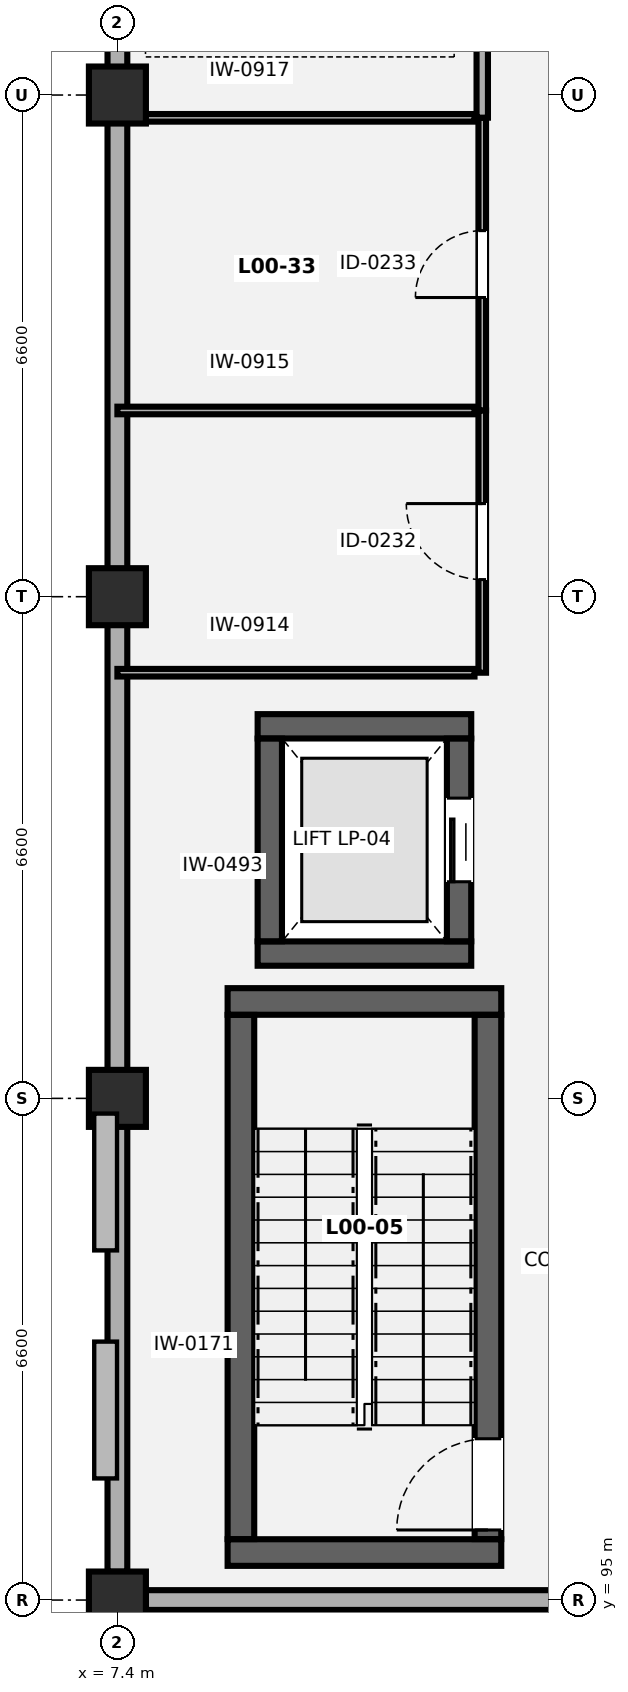
"""IFC4 building model, lengths in metres.
Left out: names, types, materials, properties, quantities, classifications, styles, units other than length and angle.
Written with IfcOpenShell. Run it as: python <this file> out.ifc"""

import sys

from ifc_helpers import new_model, si_unit, direction, frame, frame_2d, origin, origin_2d, place, context, subcontext, project, spatial, rectangle, extrude, element, fill, save


model = new_model("IFC4")
c1 = context("Model", 3, precision=1e-05, world=origin(), true_north=direction((0.0, 1.0)))
c2 = subcontext(c1, "Body", "Model", "MODEL_VIEW")
j1 = project(units=[si_unit("LENGTHUNIT", "METRE"), si_unit("PLANEANGLEUNIT", "RADIAN")], contexts=[c1])
p1 = place(None, origin())
s1 = spatial("IfcSite", under=j1, at=p1, CompositionType="ELEMENT")
p2 = place(p1, origin())
s2 = spatial("IfcBuilding", under=s1, at=p2, CompositionType="ELEMENT")
p3 = place(p2, origin())
s3 = spatial("IfcBuildingStorey", under=s2, at=p3, CompositionType="ELEMENT", Elevation=0.0)
for number, where, z_axis, x_axis in (
    (1, (7.4, 95.0, 0.0), (0.0, 0.0, 1.0), (1.0, 0.0, 0.0)),
    (2, (7.4, 101.6, 0.0), (0.0, 0.0, 1.0), (1.0, 0.0, 0.0)),
    (3, (7.4, 108.2, 0.0), (0.0, 0.0, 1.0), (1.0, 0.0, 0.0)),
    (4, (7.4, 114.8, 0.0), (0.0, 0.0, 1.0), (1.0, 0.0, 0.0)),
):
    element("IfcColumn", number, at=place(p3, frame(where, z_axis=z_axis, x_axis=x_axis)), inside=s3, PredefinedType="COLUMN", context=c2, shape_type="SweptSolid", body=[
        extrude(rectangle(XDim=0.75, YDim=0.75, at=origin_2d()), origin(), (0.0, 0.0, 1.0), 4.9),
    ])
p4 = place(p3, frame((7.4, 95.373, 0.0), z_axis=(0.0, 0.0, 1.0), x_axis=(0.0, 1.0, 0.0)))
e5 = element("IfcWall", 5, at=p4, inside=s3, PredefinedType="SOLIDWALL", context=c2, shape_type="SweptSolid", body=[
    extrude(rectangle(XDim=66.454, YDim=0.26, at=frame_2d((33.227, 0.0))), origin(), (0.0, 0.0, 1.0), 3.585),
])
p5 = place(p3, frame((26.827, 95.0, 0.0), z_axis=(0.0, 0.0, 1.0), x_axis=(-1.0, 0.0, 0.0)))
e6 = element("IfcWall", 6, at=p5, inside=s3, PredefinedType="SOLIDWALL", context=c2, shape_type="SweptSolid", body=[
    extrude(rectangle(XDim=19.054, YDim=0.26, at=frame_2d((9.527, 0.0))), origin(), (0.0, 0.0, 1.0), 3.135),
])
p6 = place(p5, frame((10.577, 0.0, 0.0)))
e7 = element("IfcOpeningElement", 7, at=p6, cuts=e6, PredefinedType="OPENING", context=c2, shape_type="SweptSolid", body=[
    extrude(rectangle(XDim=1.25, YDim=2.15, at=frame_2d((0.625, 1.075))), frame((0.0, 0.14, 0.0), z_axis=(0.0, -1.0, 0.0), x_axis=(1.0, 0.0, 0.0)), (0.0, 0.0, 1.0), 0.28),
])
for number, where, z_axis, x_axis in (
    (8, (8.85, 95.625, 0.0), (0.0, 0.0, 1.0), (1.0, 0.0, 0.0)),
    (9, (8.85, 102.875, 0.0), (0.0, 0.0, 1.0), (1.0, 0.0, 0.0)),
):
    element("IfcWall", number, at=place(p3, frame(where, z_axis=z_axis, x_axis=x_axis)), inside=s3, PredefinedType="SHEAR", context=c2, shape_type="SweptSolid", body=[
        extrude(rectangle(XDim=3.6, YDim=0.35, at=frame_2d((1.8, 0.0))), origin(), (0.0, 0.0, 1.0), 4.55),
    ])
p7 = place(p3, frame((9.025, 95.802, 0.0), z_axis=(0.0, 0.0, 1.0), x_axis=(0.0, 1.0, 0.0)))
e10 = element("IfcWall", 10, at=p7, inside=s3, PredefinedType="SHEAR", context=c2, shape_type="SweptSolid", body=[
    extrude(rectangle(XDim=6.896, YDim=0.35, at=frame_2d((3.448, 0.0))), origin(), (0.0, 0.0, 1.0), 4.55),
])
p8 = place(p3, frame((12.275, 95.802, 0.0), z_axis=(0.0, 0.0, 1.0), x_axis=(0.0, 1.0, 0.0)))
e11 = element("IfcWall", 11, at=p8, inside=s3, PredefinedType="SHEAR", context=c2, shape_type="SweptSolid", body=[
    extrude(rectangle(XDim=6.896, YDim=0.35, at=frame_2d((3.448, 0.0))), origin(), (0.0, 0.0, 1.0), 4.55),
])
p9 = place(p8, frame((0.12, 0.0, 0.0)))
e12 = element("IfcOpeningElement", 12, at=p9, cuts=e11, PredefinedType="OPENING", context=c2, shape_type="SweptSolid", body=[
    extrude(rectangle(XDim=1.2, YDim=2.15, at=frame_2d((0.6, 1.075))), frame((0.0, 0.185, 0.0), z_axis=(0.0, -1.0, 0.0), x_axis=(1.0, 0.0, 0.0)), (0.0, 0.0, 1.0), 0.37),
])
for number, where, z_axis, x_axis in (
    (13, (9.245, 103.505, 0.0), (0.0, 0.0, 1.0), (1.0, 0.0, 0.0)),
    (14, (9.245, 106.495, 0.0), (0.0, 0.0, 1.0), (1.0, 0.0, 0.0)),
):
    element("IfcWall", number, at=place(p3, frame(where, z_axis=z_axis, x_axis=x_axis)), inside=s3, PredefinedType="SHEAR", context=c2, shape_type="SweptSolid", body=[
        extrude(rectangle(XDim=2.81, YDim=0.32, at=frame_2d((1.405, 0.0))), origin(), (0.0, 0.0, 1.0), 4.55),
    ])
p10 = place(p3, frame((9.405, 103.667, 0.0), z_axis=(0.0, 0.0, 1.0), x_axis=(0.0, 1.0, 0.0)))
e15 = element("IfcWall", 15, at=p10, inside=s3, PredefinedType="SHEAR", context=c2, shape_type="SweptSolid", body=[
    extrude(rectangle(XDim=2.666, YDim=0.32, at=frame_2d((1.333, 0.0))), origin(), (0.0, 0.0, 1.0), 4.55),
])
p11 = place(p3, frame((11.895, 103.667, 0.0), z_axis=(0.0, 0.0, 1.0), x_axis=(0.0, 1.0, 0.0)))
e16 = element("IfcWall", 16, at=p11, inside=s3, PredefinedType="SHEAR", context=c2, shape_type="SweptSolid", body=[
    extrude(rectangle(XDim=2.666, YDim=0.32, at=frame_2d((1.333, 0.0))), origin(), (0.0, 0.0, 1.0), 4.55),
])
p12 = place(p11, frame((0.783, 0.0, 0.0)))
e17 = element("IfcOpeningElement", 17, at=p12, cuts=e16, PredefinedType="OPENING", context=c2, shape_type="SweptSolid", body=[
    extrude(rectangle(XDim=1.1, YDim=2.15, at=frame_2d((0.55, 1.075))), frame((0.0, 0.17, 0.0), z_axis=(0.0, -1.0, 0.0), x_axis=(1.0, 0.0, 0.0)), (0.0, 0.0, 1.0), 0.34),
])
for number, where, z_axis, x_axis in (
    (18, (7.4, 107.2, 0.0), (0.0, 0.0, 1.0), (1.0, 0.0, 0.0)),
    (19, (7.4, 110.65, 0.0), (0.0, 0.0, 1.0), (1.0, 0.0, 0.0)),
):
    element("IfcWall", number, at=place(p3, frame(where, z_axis=z_axis, x_axis=x_axis)), inside=s3, PredefinedType="PARTITIONING", context=c2, shape_type="SweptSolid", body=[
        extrude(rectangle(XDim=4.698, YDim=0.1, at=frame_2d((2.349, 0.0))), origin(), (0.0, 0.0, 1.0), 4.55),
    ])
p13 = place(p3, frame((12.2, 107.2, 0.0), z_axis=(0.0, 0.0, 1.0), x_axis=(0.0, 1.0, 0.0)))
e20 = element("IfcWall", 20, at=p13, inside=s3, PredefinedType="PARTITIONING", context=c2, shape_type="SweptSolid", body=[
    extrude(rectangle(XDim=3.45, YDim=0.1, at=frame_2d((1.725, 0.0))), origin(), (0.0, 0.0, 1.0), 4.55),
])
p14 = place(p13, frame((1.225, 0.0, 0.0)))
e21 = element("IfcOpeningElement", 21, at=p14, cuts=e20, PredefinedType="OPENING", context=c2, shape_type="SweptSolid", body=[
    extrude(rectangle(XDim=1.0, YDim=2.1, at=frame_2d((0.5, 1.05))), frame((0.0, 0.06, 0.0), z_axis=(0.0, -1.0, 0.0), x_axis=(1.0, 0.0, 0.0)), (0.0, 0.0, 1.0), 0.12),
])
p15 = place(p3, frame((7.4, 114.5, 0.0), z_axis=(0.0, 0.0, 1.0), x_axis=(1.0, 0.0, 0.0)))
e22 = element("IfcWall", 22, at=p15, inside=s3, PredefinedType="PARTITIONING", context=c2, shape_type="SweptSolid", body=[
    extrude(rectangle(XDim=4.698, YDim=0.1, at=frame_2d((2.349, 0.0))), origin(), (0.0, 0.0, 1.0), 3.135),
])
p16 = place(p3, frame((12.2, 110.652, 0.0), z_axis=(0.0, 0.0, 1.0), x_axis=(0.0, 1.0, 0.0)))
e23 = element("IfcWall", 23, at=p16, inside=s3, PredefinedType="PARTITIONING", context=c2, shape_type="SweptSolid", body=[
    extrude(rectangle(XDim=3.848, YDim=0.1, at=frame_2d((1.924, 0.0))), origin(), (0.0, 0.0, 1.0), 4.55),
])
p17 = place(p16, frame((1.484, 0.0, 0.0)))
e24 = element("IfcOpeningElement", 24, at=p17, cuts=e23, PredefinedType="OPENING", context=c2, shape_type="SweptSolid", body=[
    extrude(rectangle(XDim=0.88, YDim=2.08, at=frame_2d((0.44, 1.04))), frame((0.0, 0.06, 0.0), z_axis=(0.0, -1.0, 0.0), x_axis=(1.0, 0.0, 0.0)), (0.0, 0.0, 1.0), 0.12),
])
p18 = place(p3, frame((12.2, 114.502, 0.0), z_axis=(0.0, 0.0, 1.0), x_axis=(0.0, 1.0, 0.0)))
e25 = element("IfcWall", 25, at=p18, inside=s3, PredefinedType="PARTITIONING", context=c2, shape_type="SweptSolid", body=[
    extrude(rectangle(XDim=13.298, YDim=0.15, at=frame_2d((6.649, 0.0))), origin(), (0.0, 0.0, 1.0), 4.55),
])
p19 = place(p18, frame((5.649, 0.0, 0.0)))
e26 = element("IfcOpeningElement", 26, at=p19, cuts=e25, PredefinedType="OPENING", context=c2, shape_type="SweptSolid", body=[
    extrude(rectangle(XDim=1.3, YDim=2.2, at=frame_2d((0.65, 1.1))), frame((0.0, 0.085, 0.0), z_axis=(0.0, -1.0, 0.0), x_axis=(1.0, 0.0, 0.0)), (0.0, 0.0, 1.0), 0.17),
])
p20 = place(p9, origin())
e27 = element("IfcDoor", 27, at=p20, inside=s3, OperationType="SINGLE_SWING_LEFT", PredefinedType="DOOR", context=c2, shape_type="SweptSolid", body=[
    extrude(rectangle(XDim=1.2, YDim=2.15, at=frame_2d((0.6, 1.075))), frame((0.0, 0.025, 0.0), z_axis=(0.0, -1.0, 0.0), x_axis=(1.0, 0.0, 0.0)), (0.0, 0.0, 1.0), 0.05),
])
fill(e12, e27)
p21 = place(p12, origin())
e28 = element("IfcDoor", 28, at=p21, inside=s3, OperationType="SLIDING_TO_LEFT", PredefinedType="DOOR", context=c2, shape_type="SweptSolid", body=[
    extrude(rectangle(XDim=1.1, YDim=2.15, at=frame_2d((0.55, 1.075))), frame((0.0, 0.025, 0.0), z_axis=(0.0, -1.0, 0.0), x_axis=(1.0, 0.0, 0.0)), (0.0, 0.0, 1.0), 0.05),
])
fill(e17, e28)
p22 = place(p14, origin())
e29 = element("IfcDoor", 29, at=p22, inside=s3, OperationType="SINGLE_SWING_RIGHT", PredefinedType="DOOR", context=c2, shape_type="SweptSolid", body=[
    extrude(rectangle(XDim=1.0, YDim=2.1, at=frame_2d((0.5, 1.05))), frame((0.0, 0.025, 0.0), z_axis=(0.0, -1.0, 0.0), x_axis=(1.0, 0.0, 0.0)), (0.0, 0.0, 1.0), 0.05),
])
fill(e21, e29)
p23 = place(p17, origin())
e30 = element("IfcDoor", 30, at=p23, inside=s3, OperationType="SINGLE_SWING_LEFT", PredefinedType="DOOR", context=c2, shape_type="SweptSolid", body=[
    extrude(rectangle(XDim=0.88, YDim=2.08, at=frame_2d((0.44, 1.04))), frame((0.0, 0.025, 0.0), z_axis=(0.0, -1.0, 0.0), x_axis=(1.0, 0.0, 0.0)), (0.0, 0.0, 1.0), 0.05),
])
fill(e24, e30)
save(model, sys.argv[1])
